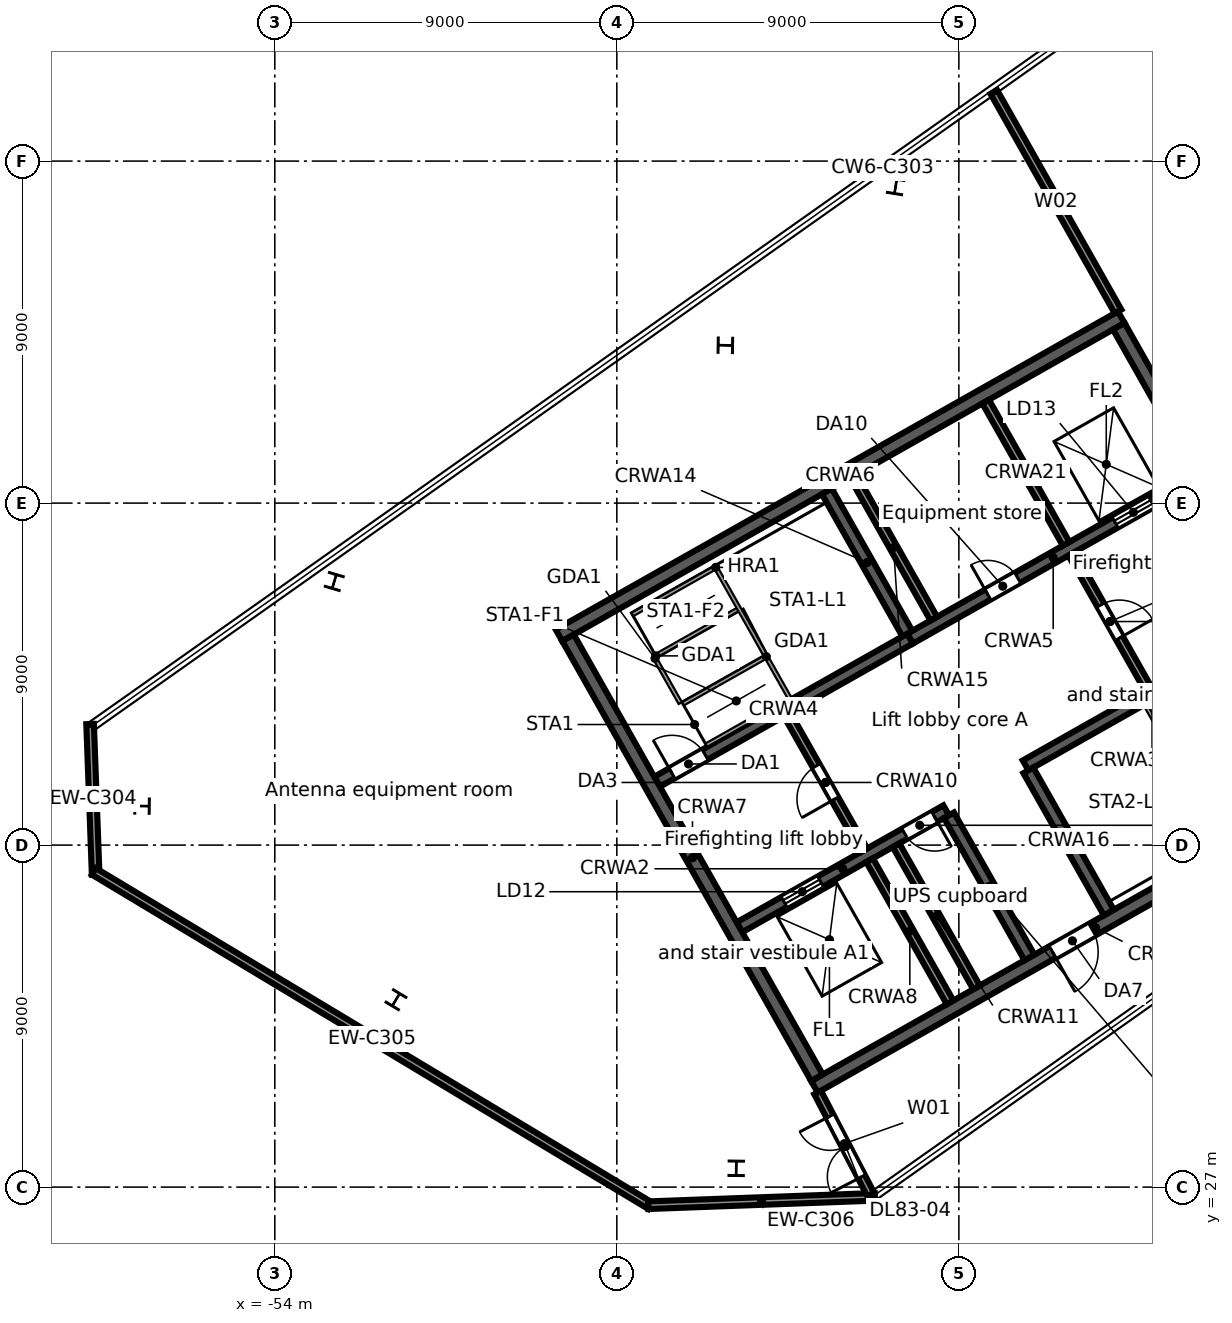
"""IFC4 building model, lengths in metres.
Left out: names, types, materials, properties, quantities, classifications, styles, units other than length and angle.
Written with IfcOpenShell. Run it as: python <this file> out.ifc"""

import sys

from ifc_helpers import new_model, si_unit, direction, frame, frame_2d, origin, origin_2d, place, context, subcontext, project, spatial, rectangle, i_section, extrude, element, fill, save


model = new_model("IFC4")
c1 = context("Model", 3, precision=1e-05, world=origin(), true_north=direction((0.0, 1.0)))
c2 = subcontext(c1, "Body", "Model", "MODEL_VIEW")
j1 = project(units=[si_unit("LENGTHUNIT", "METRE"), si_unit("PLANEANGLEUNIT", "RADIAN")], contexts=[c1])
p1 = place(None, origin())
s1 = spatial("IfcSite", under=j1, at=p1, CompositionType="ELEMENT")
p2 = place(p1, origin())
s2 = spatial("IfcBuilding", under=s1, at=p2, CompositionType="ELEMENT")
p3 = place(p2, frame((0.0, 0.0, 361.3)))
s3 = spatial("IfcBuildingStorey", under=s2, at=p3, CompositionType="ELEMENT", Elevation=361.3)
for number, where, z_axis, x_axis in (
    (1, (-57.493, 37.027, 0.0), (0.0, 0.0, 1.0), (-0.013, -1.0, 0.0)),
    (2, (-50.812, 31.931, 0.0), (0.0, 0.0, 1.0), (0.857, -0.515, 0.0)),
    (3, (-41.858, 27.495, 0.0), (0.0, 0.0, 1.0), (1.0, -0.013, 0.0)),
    (4, (-42.144, 49.153, 0.0), (0.0, 0.0, 1.0), (0.018, 1.0, 0.0)),
):
    element("IfcColumn", number, at=place(p3, frame(where, z_axis=z_axis, x_axis=x_axis)), inside=s3, PredefinedType="COLUMN", context=c2, shape_type="SweptSolid", body=[
        extrude(i_section(OverallWidth=0.4, OverallDepth=0.4, WebThickness=0.013, FlangeThickness=0.021, FilletRadius=0.022, at=origin_2d()), origin(), (0.0, 0.0, 1.0), 3.6),
    ])
for number, where, z_axis, x_axis in (
    (5, (-37.664, 53.334, -0.3), (0.0, 0.0, 1.0), (-0.987, 0.158, 0.0)),
    (6, (-52.435, 42.936, -0.3), (0.0, 0.0, 1.0), (-0.959, 0.283, 0.0)),
):
    element("IfcColumn", number, at=place(p3, frame(where, z_axis=z_axis, x_axis=x_axis)), inside=s3, PredefinedType="COLUMN", context=c2, shape_type="SweptSolid", body=[
        extrude(i_section(OverallWidth=0.4, OverallDepth=0.4, WebThickness=0.013, FlangeThickness=0.021, FilletRadius=0.022, at=origin_2d()), origin(), (0.0, 0.0, 1.0), 3.9),
    ])
p4 = place(p3, frame((-58.714, 35.226, 0.0), z_axis=(0.0, 0.0, 1.0), x_axis=(-0.036847570404, 0.999320897688, 0.0)))
e7 = element("IfcWall", 7, at=p4, inside=s3, PredefinedType="STANDARD", context=c2, shape_type="SweptSolid", body=[
    extrude(rectangle(XDim=3.962, YDim=0.2, at=frame_2d((1.981, 0.0))), origin(), (0.0, 0.0, 1.0), 3.3),
])
p5 = place(p3, frame((-44.119, 26.509, 0.0), z_axis=(0.0, 0.0, 1.0), x_axis=(-0.857168693653, 0.515035756644, 0.0)))
e8 = element("IfcWall", 8, at=p5, inside=s3, PredefinedType="STANDARD", context=c2, shape_type="SweptSolid", body=[
    extrude(rectangle(XDim=17.084, YDim=0.2, at=frame_2d((8.542, 0.0))), origin(), (0.0, 0.0, 1.0), 3.3),
])
p6 = place(p3, frame((-38.21, 26.744, 0.0), z_axis=(0.0, 0.0, 1.0), x_axis=(-0.999319030106, -0.036898185155, 0.0)))
e9 = element("IfcWall", 9, at=p6, inside=s3, PredefinedType="STANDARD", context=c2, shape_type="SweptSolid", body=[
    extrude(rectangle(XDim=5.968, YDim=0.2, at=frame_2d((2.984, 0.0))), origin(), (0.0, 0.0, 1.0), 3.3),
])
p7 = place(p3, frame((-39.801, 29.64, 0.0), z_axis=(0.0, 0.0, 1.0), x_axis=(0.870359753402, 0.492416388494, 0.0)))
e10 = element("IfcWall", 10, at=p7, inside=s3, PredefinedType="SOLIDWALL", context=c2, shape_type="SweptSolid", body=[
    extrude(rectangle(XDim=17.0, YDim=0.35, at=frame_2d((8.5, 0.0))), origin(), (0.0, 0.0, 1.0), 3.3),
])
p8 = place(p7, frame((7.2, 0.0, 0.0)))
e11 = element("IfcOpeningElement", 11, at=p8, cuts=e10, PredefinedType="OPENING", context=c2, shape_type="SweptSolid", body=[
    extrude(rectangle(XDim=1.2, YDim=2.1, at=frame_2d((0.6, 1.05))), frame((0.0, 0.185, 0.0), z_axis=(0.0, -1.0, 0.0), x_axis=(1.0, 0.0, 0.0)), (0.0, 0.0, 1.0), 0.37),
])
p9 = place(p3, frame((-41.774, 33.838, 0.0), z_axis=(0.0, 0.0, 1.0), x_axis=(0.870355415866, 0.492424055132, 0.0)))
e12 = element("IfcWall", 12, at=p9, inside=s3, PredefinedType="SOLIDWALL", context=c2, shape_type="SweptSolid", body=[
    extrude(rectangle(XDim=6.25, YDim=0.3, at=frame_2d((3.125, 0.0))), origin(), (0.0, 0.0, 1.0), 3.3),
])
p10 = place(p9, frame((1.35, 0.0, 0.0)))
e13 = element("IfcOpeningElement", 13, at=p10, cuts=e12, PredefinedType="OPENING", context=c2, shape_type="SweptSolid", body=[
    extrude(rectangle(XDim=1.1, YDim=2.1, at=frame_2d((0.55, 1.05))), frame((0.0, 0.16, 0.0), z_axis=(0.0, -1.0, 0.0), x_axis=(1.0, 0.0, 0.0)), (0.0, 0.0, 1.0), 0.32),
])
p11 = place(p9, frame((5.0, 0.0, 0.0)))
e14 = element("IfcOpeningElement", 14, at=p11, cuts=e12, PredefinedType="OPENING", context=c2, shape_type="SweptSolid", body=[
    extrude(rectangle(XDim=0.9, YDim=2.1, at=frame_2d((0.45, 1.05))), frame((0.0, 0.16, 0.0), z_axis=(0.0, -1.0, 0.0), x_axis=(1.0, 0.0, 0.0)), (0.0, 0.0, 1.0), 0.32),
])
p12 = place(p3, frame((-34.245, 38.097, 0.0), z_axis=(0.0, 0.0, 1.0), x_axis=(0.870352347706, 0.49242947804, 0.0)))
e15 = element("IfcWall", 15, at=p12, inside=s3, PredefinedType="SOLIDWALL", context=c2, shape_type="SweptSolid", body=[
    extrude(rectangle(XDim=7.65, YDim=0.3, at=frame_2d((3.825, 0.0))), origin(), (0.0, 0.0, 1.0), 3.3),
])
p13 = place(p12, frame((6.2, 0.0, 0.0)))
e16 = element("IfcOpeningElement", 16, at=p13, cuts=e15, PredefinedType="OPENING", context=c2, shape_type="SweptSolid", body=[
    extrude(rectangle(XDim=1.0, YDim=2.1, at=frame_2d((0.5, 1.05))), frame((0.0, 0.16, 0.0), z_axis=(0.0, -1.0, 0.0), x_axis=(1.0, 0.0, 0.0)), (0.0, 0.0, 1.0), 0.32),
])
p14 = place(p3, frame((-43.94, 37.667, 0.0), z_axis=(0.0, 0.0, 1.0), x_axis=(0.870352347706, 0.49242947804, 0.0)))
e17 = element("IfcWall", 17, at=p14, inside=s3, PredefinedType="SOLIDWALL", context=c2, shape_type="SweptSolid", body=[
    extrude(rectangle(XDim=7.65, YDim=0.3, at=frame_2d((3.825, 0.0))), origin(), (0.0, 0.0, 1.0), 3.3),
])
p15 = place(p14, frame((0.45, 0.0, 0.0)))
e18 = element("IfcOpeningElement", 18, at=p15, cuts=e17, PredefinedType="OPENING", context=c2, shape_type="SweptSolid", body=[
    extrude(rectangle(XDim=1.0, YDim=2.1, at=frame_2d((0.5, 1.05))), frame((0.0, 0.16, 0.0), z_axis=(0.0, -1.0, 0.0), x_axis=(1.0, 0.0, 0.0)), (0.0, 0.0, 1.0), 0.32),
])
p16 = place(p3, frame((-37.282, 41.435, 0.0), z_axis=(0.0, 0.0, 1.0), x_axis=(0.870364588774, 0.492407841741, 0.0)))
e19 = element("IfcWall", 19, at=p16, inside=s3, PredefinedType="SOLIDWALL", context=c2, shape_type="SweptSolid", body=[
    extrude(rectangle(XDim=8.65, YDim=0.3, at=frame_2d((4.325, 0.0))), origin(), (0.0, 0.0, 1.0), 3.3),
])
p17 = place(p16, frame((6.2, 0.0, 0.0)))
e20 = element("IfcOpeningElement", 20, at=p17, cuts=e19, PredefinedType="OPENING", context=c2, shape_type="SweptSolid", body=[
    extrude(rectangle(XDim=1.1, YDim=2.1, at=frame_2d((0.55, 1.05))), frame((0.0, 0.16, 0.0), z_axis=(0.0, -1.0, 0.0), x_axis=(1.0, 0.0, 0.0)), (0.0, 0.0, 1.0), 0.32),
])
p18 = place(p16, frame((2.35, 0.0, 0.0)))
e21 = element("IfcOpeningElement", 21, at=p18, cuts=e19, PredefinedType="OPENING", context=c2, shape_type="SweptSolid", body=[
    extrude(rectangle(XDim=0.9, YDim=2.1, at=frame_2d((0.45, 1.05))), frame((0.0, 0.16, 0.0), z_axis=(0.0, -1.0, 0.0), x_axis=(1.0, 0.0, 0.0)), (0.0, 0.0, 1.0), 0.32),
])
p19 = place(p3, frame((-46.522, 41.521, 0.0), z_axis=(0.0, 0.0, 1.0), x_axis=(0.870359753402, 0.492416388494, 0.0)))
e22 = element("IfcWall", 22, at=p19, inside=s3, PredefinedType="SOLIDWALL", context=c2, shape_type="SweptSolid", body=[
    extrude(rectangle(XDim=17.0, YDim=0.35, at=frame_2d((8.5, 0.0))), origin(), (0.0, 0.0, 1.0), 3.3),
])
p20 = place(p3, frame((-46.284, 41.454, 0.0), z_axis=(0.0, 0.0, 1.0), x_axis=(0.492429810477, -0.870352159619, 0.0)))
e23 = element("IfcWall", 23, at=p20, inside=s3, PredefinedType="SOLIDWALL", context=c2, shape_type="SweptSolid", body=[
    extrude(rectangle(XDim=13.3, YDim=0.35, at=frame_2d((6.65, 0.0))), origin(), (0.0, 0.0, 1.0), 3.3),
])
p21 = place(p3, frame((-38.349, 35.603, 0.0), z_axis=(0.0, 0.0, 1.0), x_axis=(0.492410799949, -0.870362915164, 0.0)))
e24 = element("IfcWall", 24, at=p21, inside=s3, PredefinedType="SOLIDWALL", context=c2, shape_type="SweptSolid", body=[
    extrude(rectangle(XDim=4.3, YDim=0.2, at=frame_2d((2.15, 0.0))), origin(), (0.0, 0.0, 1.0), 3.3),
])
p22 = place(p3, frame((-40.516, 39.433, 0.0), z_axis=(0.0, 0.0, 1.0), x_axis=(0.492453559952, -0.87033872216, 0.0)))
e25 = element("IfcWall", 25, at=p22, inside=s3, PredefinedType="PARTITIONING", context=c2, shape_type="SweptSolid", body=[
    extrude(rectangle(XDim=4.1, YDim=0.2, at=frame_2d((2.05, 0.0))), origin(), (0.0, 0.0, 1.0), 3.3),
])
p23 = place(p22, frame((1.55, 0.0, 0.0)))
e26 = element("IfcOpeningElement", 26, at=p23, cuts=e25, PredefinedType="OPENING", context=c2, shape_type="SweptSolid", body=[
    extrude(rectangle(XDim=1.0, YDim=2.1, at=frame_2d((0.5, 1.05))), frame((0.0, 0.11, 0.0), z_axis=(0.0, -1.0, 0.0), x_axis=(1.0, 0.0, 0.0)), (0.0, 0.0, 1.0), 0.22),
])
p24 = place(p3, frame((-37.653, 35.997, 0.0), z_axis=(0.0, 0.0, 1.0), x_axis=(0.492435133428, -0.870349147967, 0.0)))
e27 = element("IfcWall", 27, at=p24, inside=s3, PredefinedType="SOLIDWALL", context=c2, shape_type="SweptSolid", body=[
    extrude(rectangle(XDim=4.3, YDim=0.2, at=frame_2d((2.15, 0.0))), origin(), (0.0, 0.0, 1.0), 3.3),
])
p25 = place(p3, frame((-36.26, 36.785, 0.0), z_axis=(0.0, 0.0, 1.0), x_axis=(0.492435133428, -0.870349147967, 0.0)))
e28 = element("IfcWall", 28, at=p25, inside=s3, PredefinedType="SOLIDWALL", context=c2, shape_type="SweptSolid", body=[
    extrude(rectangle(XDim=4.3, YDim=0.3, at=frame_2d((2.15, 0.0))), origin(), (0.0, 0.0, 1.0), 3.3),
])
p26 = place(p3, frame((-39.473, 45.308, 0.0), z_axis=(0.0, 0.0, 1.0), x_axis=(0.492410799949, -0.870362915164, 0.0)))
e29 = element("IfcWall", 29, at=p26, inside=s3, PredefinedType="SOLIDWALL", context=c2, shape_type="SweptSolid", body=[
    extrude(rectangle(XDim=4.3, YDim=0.3, at=frame_2d((2.15, 0.0))), origin(), (0.0, 0.0, 1.0), 3.3),
])
p27 = place(p3, frame((-38.777, 45.701, 0.0), z_axis=(0.0, 0.0, 1.0), x_axis=(0.492435133428, -0.870349147967, 0.0)))
e30 = element("IfcWall", 30, at=p27, inside=s3, PredefinedType="SOLIDWALL", context=c2, shape_type="SweptSolid", body=[
    extrude(rectangle(XDim=4.3, YDim=0.2, at=frame_2d((2.15, 0.0))), origin(), (0.0, 0.0, 1.0), 3.3),
])
p28 = place(p3, frame((-34.171, 37.967, 0.0), z_axis=(0.0, 0.0, 1.0), x_axis=(0.492435133428, -0.870349147967, 0.0)))
e31 = element("IfcWall", 31, at=p28, inside=s3, PredefinedType="SOLIDWALL", context=c2, shape_type="SweptSolid", body=[
    extrude(rectangle(XDim=4.3, YDim=0.3, at=frame_2d((2.15, 0.0))), origin(), (0.0, 0.0, 1.0), 3.3),
])
p29 = place(p3, frame((-33.031, 43.667, 0.0), z_axis=(0.0, 0.0, 1.0), x_axis=(0.492408451753, -0.87036424366, 0.0)))
e32 = element("IfcWall", 32, at=p29, inside=s3, PredefinedType="PARTITIONING", context=c2, shape_type="SweptSolid", body=[
    extrude(rectangle(XDim=4.1, YDim=0.2, at=frame_2d((2.05, 0.0))), origin(), (0.0, 0.0, 1.0), 3.3),
])
p30 = place(p29, frame((1.55, 0.0, 0.0)))
e33 = element("IfcOpeningElement", 33, at=p30, cuts=e32, PredefinedType="OPENING", context=c2, shape_type="SweptSolid", body=[
    extrude(rectangle(XDim=1.0, YDim=2.1, at=frame_2d((0.5, 1.05))), frame((0.0, 0.11, 0.0), z_axis=(0.0, -1.0, 0.0), x_axis=(1.0, 0.0, 0.0)), (0.0, 0.0, 1.0), 0.22),
])
p31 = place(p3, frame((-35.296, 47.671, 0.0), z_axis=(0.0, 0.0, 1.0), x_axis=(0.492435133428, -0.870349147967, 0.0)))
e34 = element("IfcWall", 34, at=p31, inside=s3, PredefinedType="SOLIDWALL", context=c2, shape_type="SweptSolid", body=[
    extrude(rectangle(XDim=4.3, YDim=0.2, at=frame_2d((2.15, 0.0))), origin(), (0.0, 0.0, 1.0), 3.3),
])
p32 = place(p3, frame((-31.792, 49.653, 0.0), z_axis=(0.0, 0.0, 1.0), x_axis=(0.492421943245, -0.870356610712, 0.0)))
e35 = element("IfcWall", 35, at=p32, inside=s3, PredefinedType="SOLIDWALL", context=c2, shape_type="SweptSolid", body=[
    extrude(rectangle(XDim=13.3, YDim=0.35, at=frame_2d((6.65, 0.0))), origin(), (0.0, 0.0, 1.0), 3.3),
])
p33 = place(p3, frame((-39.715, 29.488, 0.0), z_axis=(0.0, 0.0, 1.0), x_axis=(0.461720517785, -0.887025458178, 0.0)))
e36 = element("IfcWall", 36, at=p33, inside=s3, PredefinedType="PARTITIONING", context=c2, shape_type="SweptSolid", body=[
    extrude(rectangle(XDim=3.03, YDim=0.2, at=frame_2d((1.515, 0.0))), origin(), (0.0, 0.0, 1.0), 3.3),
])
p34 = place(p33, frame((0.7, 0.0, 0.0)))
e37 = element("IfcOpeningElement", 37, at=p34, cuts=e36, PredefinedType="OPENING", context=c2, shape_type="SweptSolid", body=[
    extrude(rectangle(XDim=1.8, YDim=2.1, at=frame_2d((0.9, 1.05))), frame((0.0, 0.11, 0.0), z_axis=(0.0, -1.0, 0.0), x_axis=(1.0, 0.0, 0.0)), (0.0, 0.0, 1.0), 0.22),
])
p35 = place(p3, frame((-35.08, 55.819, 0.0), z_axis=(0.0, 0.0, 1.0), x_axis=(0.49249727422, -0.870313986379, 0.0)))
e38 = element("IfcWall", 38, at=p35, inside=s3, PredefinedType="PARTITIONING", context=c2, shape_type="SweptSolid", body=[
    extrude(rectangle(XDim=6.636, YDim=0.2, at=frame_2d((3.318, 0.0))), origin(), (0.0, 0.0, 1.0), 2.68),
])
p36 = place(p3, frame((-31.031, 58.679, 0.0), z_axis=(0.0, 0.0, 1.0), x_axis=(0.495492853456, -0.868612014753, 0.0)))
e39 = element("IfcWall", 39, at=p36, inside=s3, PredefinedType="PARTITIONING", context=c2, shape_type="SweptSolid", body=[
    extrude(rectangle(XDim=19.13, YDim=0.2, at=frame_2d((9.565, 0.0))), origin(), (0.0, 0.0, 1.0), 2.68),
])
p37 = place(p17, origin())
e40 = element("IfcDoor", 40, at=p37, inside=s3, OperationType="DOUBLE_DOOR_SLIDING", PredefinedType="DOOR", context=c2, shape_type="SweptSolid", body=[
    extrude(rectangle(XDim=1.1, YDim=2.1, at=frame_2d((0.55, 1.05))), frame((0.0, 0.025, 0.0), z_axis=(0.0, -1.0, 0.0), x_axis=(1.0, 0.0, 0.0)), (0.0, 0.0, 1.0), 0.05),
])
fill(e20, e40)
p38 = place(p10, origin())
e41 = element("IfcDoor", 41, at=p38, inside=s3, OperationType="DOUBLE_DOOR_SLIDING", PredefinedType="DOOR", context=c2, shape_type="SweptSolid", body=[
    extrude(rectangle(XDim=1.1, YDim=2.1, at=frame_2d((0.55, 1.05))), frame((0.0, 0.025, 0.0), z_axis=(0.0, -1.0, 0.0), x_axis=(1.0, 0.0, 0.0)), (0.0, 0.0, 1.0), 0.05),
])
fill(e13, e41)
p39 = place(p15, origin())
e42 = element("IfcDoor", 42, at=p39, inside=s3, OperationType="SINGLE_SWING_LEFT", PredefinedType="DOOR", context=c2, shape_type="SweptSolid", body=[
    extrude(rectangle(XDim=1.0, YDim=2.1, at=frame_2d((0.5, 1.05))), frame((0.0, 0.025, 0.0), z_axis=(0.0, -1.0, 0.0), x_axis=(1.0, 0.0, 0.0)), (0.0, 0.0, 1.0), 0.05),
])
fill(e18, e42)
p40 = place(p23, frame((1.0, 0.0, 0.0), z_axis=(0.0, 0.0, 1.0), x_axis=(-1.0, 0.0, 0.0)))
e43 = element("IfcDoor", 43, at=p40, inside=s3, OperationType="SINGLE_SWING_LEFT", PredefinedType="DOOR", context=c2, shape_type="SweptSolid", body=[
    extrude(rectangle(XDim=1.0, YDim=2.1, at=frame_2d((0.5, 1.05))), frame((0.0, 0.025, 0.0), z_axis=(0.0, -1.0, 0.0), x_axis=(1.0, 0.0, 0.0)), (0.0, 0.0, 1.0), 0.05),
])
fill(e26, e43)
p41 = place(p30, origin())
e44 = element("IfcDoor", 44, at=p41, inside=s3, OperationType="SINGLE_SWING_RIGHT", PredefinedType="DOOR", context=c2, shape_type="SweptSolid", body=[
    extrude(rectangle(XDim=1.0, YDim=2.1, at=frame_2d((0.5, 1.05))), frame((0.0, 0.025, 0.0), z_axis=(0.0, -1.0, 0.0), x_axis=(1.0, 0.0, 0.0)), (0.0, 0.0, 1.0), 0.05),
])
fill(e33, e44)
p42 = place(p8, frame((1.2, 0.0, 0.0), z_axis=(0.0, 0.0, 1.0), x_axis=(-1.0, 0.0, 0.0)))
e45 = element("IfcDoor", 45, at=p42, inside=s3, OperationType="SINGLE_SWING_RIGHT", PredefinedType="DOOR", context=c2, shape_type="SweptSolid", body=[
    extrude(rectangle(XDim=1.2, YDim=2.1, at=frame_2d((0.6, 1.05))), frame((0.0, 0.025, 0.0), z_axis=(0.0, -1.0, 0.0), x_axis=(1.0, 0.0, 0.0)), (0.0, 0.0, 1.0), 0.05),
])
fill(e11, e45)
p43 = place(p18, origin())
e46 = element("IfcDoor", 46, at=p43, inside=s3, OperationType="SINGLE_SWING_LEFT", PredefinedType="DOOR", context=c2, shape_type="SweptSolid", body=[
    extrude(rectangle(XDim=0.9, YDim=2.1, at=frame_2d((0.45, 1.05))), frame((0.0, 0.025, 0.0), z_axis=(0.0, -1.0, 0.0), x_axis=(1.0, 0.0, 0.0)), (0.0, 0.0, 1.0), 0.05),
])
fill(e21, e46)
p44 = place(p11, frame((0.9, 0.0, 0.0), z_axis=(0.0, 0.0, 1.0), x_axis=(-1.0, 0.0, 0.0)))
e47 = element("IfcDoor", 47, at=p44, inside=s3, OperationType="SINGLE_SWING_LEFT", PredefinedType="DOOR", context=c2, shape_type="SweptSolid", body=[
    extrude(rectangle(XDim=0.9, YDim=2.1, at=frame_2d((0.45, 1.05))), frame((0.0, 0.025, 0.0), z_axis=(0.0, -1.0, 0.0), x_axis=(1.0, 0.0, 0.0)), (0.0, 0.0, 1.0), 0.05),
])
fill(e14, e47)
p45 = place(p34, frame((1.8, 0.0, 0.0), z_axis=(0.0, 0.0, 1.0), x_axis=(-1.0, 0.0, 0.0)))
e48 = element("IfcDoor", 48, at=p45, inside=s3, OperationType="DOUBLE_DOOR_SINGLE_SWING", PredefinedType="DOOR", context=c2, shape_type="SweptSolid", body=[
    extrude(rectangle(XDim=1.8, YDim=2.1, at=frame_2d((0.9, 1.05))), frame((0.0, 0.025, 0.0), z_axis=(0.0, -1.0, 0.0), x_axis=(1.0, 0.0, 0.0)), (0.0, 0.0, 1.0), 0.05),
])
fill(e37, e48)
save(model, sys.argv[1])
